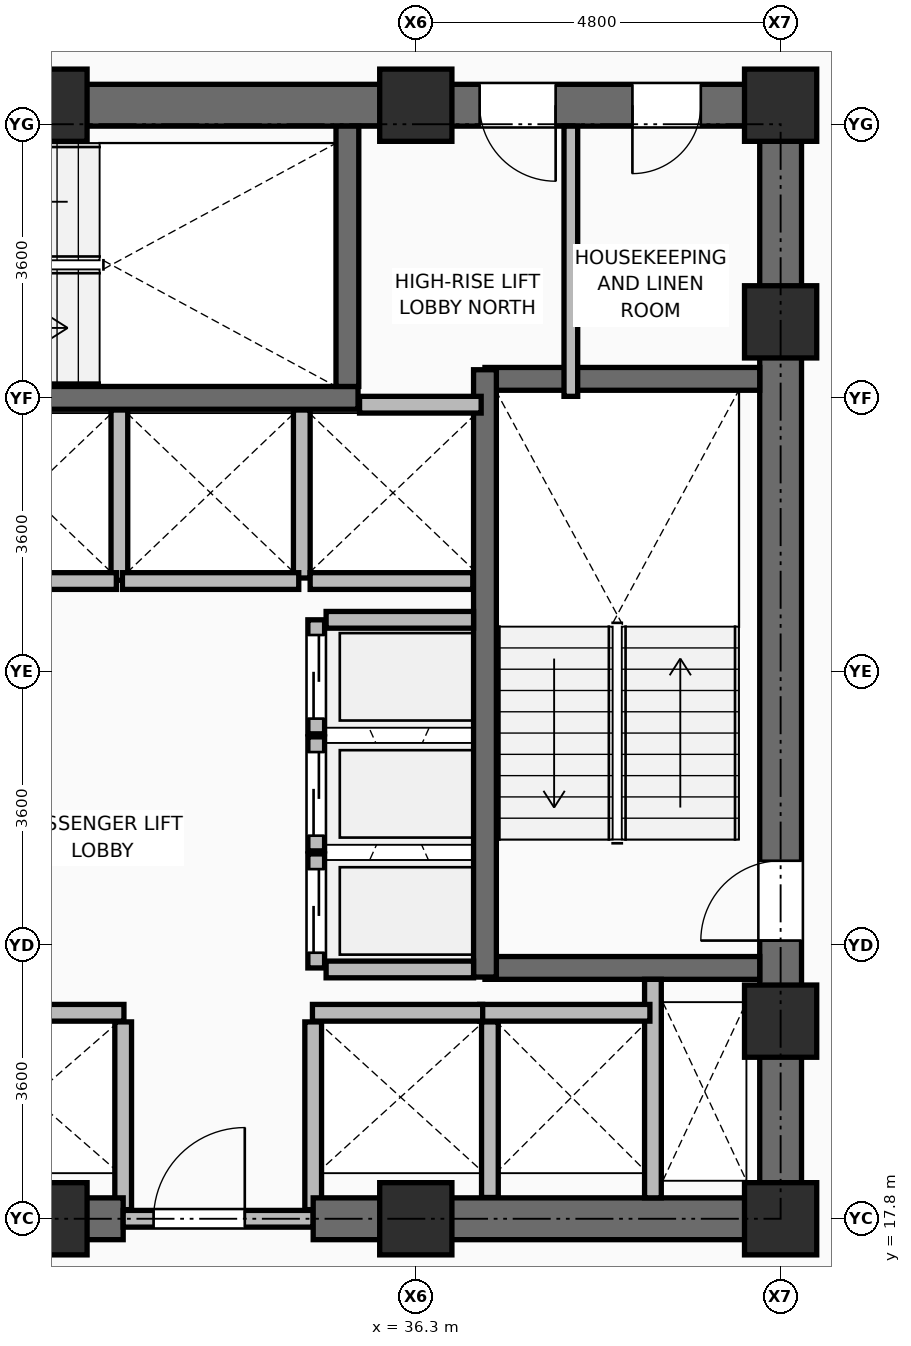
"""IFC4 building model, lengths in metres.
Left out: names, types, materials, properties, quantities, classifications, styles, units other than length and angle.
Written with IfcOpenShell. Run it as: python <this file> out.ifc"""

import sys

from ifc_helpers import new_model, si_unit, direction, frame, frame_2d, origin, origin_2d, place, context, subcontext, project, spatial, rectangle, extrude, element, fill, save


model = new_model("IFC4")
c1 = context("Model", 3, precision=1e-05, world=origin(), true_north=direction((0.0, 1.0)))
c2 = subcontext(c1, "Body", "Model", "MODEL_VIEW")
j1 = project(units=[si_unit("LENGTHUNIT", "METRE"), si_unit("PLANEANGLEUNIT", "RADIAN")], contexts=[c1])
p1 = place(None, origin())
s1 = spatial("IfcSite", under=j1, at=p1, CompositionType="ELEMENT")
p2 = place(p1, origin())
s2 = spatial("IfcBuilding", under=s1, at=p2, CompositionType="ELEMENT")
p3 = place(p2, frame((0.0, 0.0, 142.2)))
s3 = spatial("IfcBuildingStorey", under=s2, at=p3, CompositionType="ELEMENT", Elevation=142.2)
for number, where, z_axis, x_axis in (
    (1, (31.5, 17.8, 0.0), (0.0, 0.0, 1.0), (1.0, 0.0, 0.0)),
    (2, (36.3, 17.8, 0.0), (0.0, 0.0, 1.0), (1.0, 0.0, 0.0)),
    (3, (41.1, 17.8, 0.0), (0.0, 0.0, 1.0), (1.0, 0.0, 0.0)),
    (4, (41.1, 20.4, 0.0), (0.0, 0.0, 1.0), (1.0, 0.0, 0.0)),
    (5, (41.1, 29.6, 0.0), (0.0, 0.0, 1.0), (1.0, 0.0, 0.0)),
    (6, (31.5, 32.45, 0.0), (0.0, 0.0, 1.0), (1.0, 0.0, 0.0)),
    (7, (36.3, 32.45, 0.0), (0.0, 0.0, 1.0), (1.0, 0.0, 0.0)),
    (8, (41.1, 32.45, 0.0), (0.0, 0.0, 1.0), (1.0, 0.0, 0.0)),
):
    element("IfcColumn", number, at=place(p3, frame(where, z_axis=z_axis, x_axis=x_axis)), inside=s3, PredefinedType="COLUMN", context=c2, shape_type="SweptSolid", body=[
        extrude(rectangle(XDim=0.95, YDim=0.95, at=origin_2d()), origin(), (0.0, 0.0, 1.0), 3.75),
    ])
for number, where, z_axis, x_axis in (
    (9, (32.45, 17.92, 0.0), (0.0, 0.0, 1.0), (0.0, 1.0, 0.0)),
    (10, (34.95, 17.92, 0.0), (0.0, 0.0, 1.0), (0.0, 1.0, 0.0)),
):
    element("IfcWall", number, at=place(p3, frame(where, z_axis=z_axis, x_axis=x_axis)), inside=s3, PredefinedType="PARTITIONING", context=c2, shape_type="SweptSolid", body=[
        extrude(rectangle(XDim=2.47, YDim=0.22, at=frame_2d((1.235, 0.0))), origin(), (0.0, 0.0, 1.0), 3.006),
    ])
p4 = place(p3, frame((37.275, 18.08, 0.0), z_axis=(0.0, 0.0, 1.0), x_axis=(0.0, 1.0, 0.0)))
e11 = element("IfcWall", 11, at=p4, inside=s3, PredefinedType="PARTITIONING", context=c2, shape_type="SweptSolid", body=[
    extrude(rectangle(XDim=2.31, YDim=0.22, at=frame_2d((1.155, 0.0))), origin(), (0.0, 0.0, 1.0), 3.545),
])
p5 = place(p3, frame((32.4, 26.2, 0.0), z_axis=(0.0, 0.0, 1.0), x_axis=(0.0, 1.0, 0.0)))
e12 = element("IfcWall", 12, at=p5, inside=s3, PredefinedType="PARTITIONING", context=c2, shape_type="SweptSolid", body=[
    extrude(rectangle(XDim=2.24, YDim=0.22, at=frame_2d((1.12, 0.0))), origin(), (0.0, 0.0, 1.0), 3.545),
])
p6 = place(p3, frame((34.8, 26.23, 0.0), z_axis=(0.0, 0.0, 1.0), x_axis=(0.0, 1.0, 0.0)))
e13 = element("IfcWall", 13, at=p6, inside=s3, PredefinedType="PARTITIONING", context=c2, shape_type="SweptSolid", body=[
    extrude(rectangle(XDim=2.21, YDim=0.22, at=frame_2d((1.105, 0.0))), origin(), (0.0, 0.0, 1.0), 3.545),
])
p7 = place(p3, frame((34.91, 26.19, 0.0), z_axis=(0.0, 0.0, 1.0), x_axis=(1.0, 0.0, 0.0)))
e14 = element("IfcWall", 14, at=p7, inside=s3, PredefinedType="PARTITIONING", context=c2, shape_type="SweptSolid", body=[
    extrude(rectangle(XDim=2.14, YDim=0.22, at=frame_2d((1.07, 0.0))), origin(), (0.0, 0.0, 1.0), 3.545),
])
p8 = place(p3, frame((25.55, 17.8, 0.0), z_axis=(0.0, 0.0, 1.0), x_axis=(1.0, 0.0, 0.0)))
e15 = element("IfcWall", 15, at=p8, inside=s3, PredefinedType="SHEAR", context=c2, shape_type="SweptSolid", body=[
    extrude(rectangle(XDim=6.9, YDim=0.55, at=frame_2d((3.45, 0.0))), origin(), (0.0, 0.0, 1.0), 3.57),
])
p9 = place(p3, frame((32.45, 17.8, 0.0), z_axis=(0.0, 0.0, 1.0), x_axis=(1.0, 0.0, 0.0)))
e16 = element("IfcWall", 16, at=p9, inside=s3, PredefinedType="PARTITIONING", context=c2, shape_type="SweptSolid", body=[
    extrude(rectangle(XDim=2.5, YDim=0.22, at=frame_2d((1.25, 0.0))), origin(), (0.0, 0.0, 1.0), 3.006),
])
p10 = place(p9, frame((0.4, 0.0, 0.0)))
e17 = element("IfcOpeningElement", 17, at=p10, cuts=e16, PredefinedType="OPENING", context=c2, shape_type="SweptSolid", body=[
    extrude(rectangle(XDim=1.2, YDim=2.1, at=frame_2d((0.6, 1.05))), frame((0.0, 0.12, 0.0), z_axis=(0.0, -1.0, 0.0), x_axis=(1.0, 0.0, 0.0)), (0.0, 0.0, 1.0), 0.24),
])
p11 = place(p3, frame((34.95, 17.8, 0.0), z_axis=(0.0, 0.0, 1.0), x_axis=(1.0, 0.0, 0.0)))
e18 = element("IfcWall", 18, at=p11, inside=s3, PredefinedType="SHEAR", context=c2, shape_type="SweptSolid", body=[
    extrude(rectangle(XDim=6.425, YDim=0.55, at=frame_2d((3.212, 0.0))), origin(), (0.0, 0.0, 1.0), 3.57),
])
p12 = place(p3, frame((21.625, 32.45, 0.0), z_axis=(0.0, 0.0, 1.0), x_axis=(1.0, 0.0, 0.0)))
e19 = element("IfcWall", 19, at=p12, inside=s3, PredefinedType="SHEAR", context=c2, shape_type="SweptSolid", body=[
    extrude(rectangle(XDim=19.75, YDim=0.55, at=frame_2d((9.875, 0.0))), origin(), (0.0, 0.0, 1.0), 3.57),
])
p13 = place(p12, frame((2.125, 0.0, 0.0)))
e20 = element("IfcOpeningElement", 20, at=p13, cuts=e19, PredefinedType="OPENING", context=c2, shape_type="SweptSolid", body=[
    extrude(rectangle(XDim=1.1, YDim=2.1, at=frame_2d((0.55, 1.05))), frame((0.0, 0.285, 0.0), z_axis=(0.0, -1.0, 0.0), x_axis=(1.0, 0.0, 0.0)), (0.0, 0.0, 1.0), 0.57),
])
p14 = place(p12, frame((15.515, 0.0, 0.0)))
e21 = element("IfcOpeningElement", 21, at=p14, cuts=e19, PredefinedType="OPENING", context=c2, shape_type="SweptSolid", body=[
    extrude(rectangle(XDim=1.0, YDim=2.1, at=frame_2d((0.5, 1.05))), frame((0.0, 0.285, 0.0), z_axis=(0.0, -1.0, 0.0), x_axis=(1.0, 0.0, 0.0)), (0.0, 0.0, 1.0), 0.57),
])
p15 = place(p12, frame((17.525, 0.0, 0.0)))
e22 = element("IfcOpeningElement", 22, at=p15, cuts=e19, PredefinedType="OPENING", context=c2, shape_type="SweptSolid", body=[
    extrude(rectangle(XDim=0.9, YDim=2.1, at=frame_2d((0.45, 1.05))), frame((0.0, 0.285, 0.0), z_axis=(0.0, -1.0, 0.0), x_axis=(1.0, 0.0, 0.0)), (0.0, 0.0, 1.0), 0.57),
])
p16 = place(p3, frame((41.1, 18.075, 0.0), z_axis=(0.0, 0.0, 1.0), x_axis=(0.0, 1.0, 0.0)))
e23 = element("IfcWall", 23, at=p16, inside=s3, PredefinedType="SHEAR", context=c2, shape_type="SweptSolid", body=[
    extrude(rectangle(XDim=14.1, YDim=0.55, at=frame_2d((7.05, 0.0))), origin(), (0.0, 0.0, 1.0), 3.57),
])
p17 = place(p16, frame((3.385, 0.0, 0.0)))
e24 = element("IfcOpeningElement", 24, at=p17, cuts=e23, PredefinedType="OPENING", context=c2, shape_type="SweptSolid", body=[
    extrude(rectangle(XDim=1.05, YDim=2.1, at=frame_2d((0.525, 1.05))), frame((0.0, 0.285, 0.0), z_axis=(0.0, -1.0, 0.0), x_axis=(1.0, 0.0, 0.0)), (0.0, 0.0, 1.0), 0.57),
])
for number, where, z_axis, x_axis in (
    (25, (37.21, 21.1, 0.0), (0.0, 0.0, 1.0), (1.0, 0.0, 0.0)),
    (26, (37.21, 28.85, 0.0), (0.0, 0.0, 1.0), (1.0, 0.0, 0.0)),
):
    element("IfcWall", number, at=place(p3, frame(where, z_axis=z_axis, x_axis=x_axis)), inside=s3, PredefinedType="SHEAR", context=c2, shape_type="SweptSolid", body=[
        extrude(rectangle(XDim=3.615, YDim=0.3, at=frame_2d((1.808, 0.0))), origin(), (0.0, 0.0, 1.0), 3.57),
    ])
p18 = place(p3, frame((37.21, 20.98, 0.0), z_axis=(0.0, 0.0, 1.0), x_axis=(0.0, 1.0, 0.0)))
e27 = element("IfcWall", 27, at=p18, inside=s3, PredefinedType="SHEAR", context=c2, shape_type="SweptSolid", body=[
    extrude(rectangle(XDim=7.99, YDim=0.3, at=frame_2d((3.995, 0.0))), origin(), (0.0, 0.0, 1.0), 3.57),
])
p19 = place(p3, frame((27.51, 28.6, 0.0), z_axis=(0.0, 0.0, 1.0), x_axis=(1.0, 0.0, 0.0)))
e28 = element("IfcWall", 28, at=p19, inside=s3, PredefinedType="SHEAR", context=c2, shape_type="SweptSolid", body=[
    extrude(rectangle(XDim=8.03, YDim=0.3, at=frame_2d((4.015, 0.0))), origin(), (0.0, 0.0, 1.0), 3.57),
])
p20 = place(p3, frame((35.4, 28.75, 0.0), z_axis=(0.0, 0.0, 1.0), x_axis=(0.0, 1.0, 0.0)))
e29 = element("IfcWall", 29, at=p20, inside=s3, PredefinedType="SHEAR", context=c2, shape_type="SweptSolid", body=[
    extrude(rectangle(XDim=3.425, YDim=0.3, at=frame_2d((1.712, 0.0))), origin(), (0.0, 0.0, 1.0), 3.57),
])
p21 = place(p3, frame((39.42, 18.075, 0.0), z_axis=(0.0, 0.0, 1.0), x_axis=(0.0, 1.0, 0.0)))
e30 = element("IfcWall", 30, at=p21, inside=s3, PredefinedType="PARTITIONING", context=c2, shape_type="SweptSolid", body=[
    extrude(rectangle(XDim=2.875, YDim=0.22, at=frame_2d((1.438, 0.0))), origin(), (0.0, 0.0, 1.0), 3.55),
])
p22 = place(p3, frame((30.04, 20.51, 0.0), z_axis=(0.0, 0.0, 1.0), x_axis=(1.0, 0.0, 0.0)))
e31 = element("IfcWall", 31, at=p22, inside=s3, PredefinedType="PARTITIONING", context=c2, shape_type="SweptSolid", body=[
    extrude(rectangle(XDim=2.42, YDim=0.22, at=frame_2d((1.21, 0.0))), origin(), (0.0, 0.0, 1.0), 3.55),
])
for number, where, z_axis, x_axis in (
    (32, (37.14, 20.51, 0.0), (0.0, 0.0, 1.0), (1.0, 0.0, 0.0)),
    (33, (34.94, 20.51, 0.0), (0.0, 0.0, 1.0), (1.0, 0.0, 0.0)),
):
    element("IfcWall", number, at=place(p3, frame(where, z_axis=z_axis, x_axis=x_axis)), inside=s3, PredefinedType="PARTITIONING", context=c2, shape_type="SweptSolid", body=[
        extrude(rectangle(XDim=2.24, YDim=0.22, at=frame_2d((1.12, 0.0))), origin(), (0.0, 0.0, 1.0), 3.55),
    ])
for number, where, z_axis, x_axis in (
    (34, (30.04, 26.19, 0.0), (0.0, 0.0, 1.0), (1.0, 0.0, 0.0)),
    (35, (32.44, 26.19, 0.0), (0.0, 0.0, 1.0), (1.0, 0.0, 0.0)),
):
    element("IfcWall", number, at=place(p3, frame(where, z_axis=z_axis, x_axis=x_axis)), inside=s3, PredefinedType="PARTITIONING", context=c2, shape_type="SweptSolid", body=[
        extrude(rectangle(XDim=2.32, YDim=0.22, at=frame_2d((1.16, 0.0))), origin(), (0.0, 0.0, 1.0), 3.55),
    ])
p23 = place(p3, frame((35.56, 28.51, 0.0), z_axis=(0.0, 0.0, 1.0), x_axis=(1.0, 0.0, 0.0)))
e36 = element("IfcWall", 36, at=p23, inside=s3, PredefinedType="PARTITIONING", context=c2, shape_type="SweptSolid", body=[
    extrude(rectangle(XDim=1.6, YDim=0.22, at=frame_2d((0.8, 0.0))), origin(), (0.0, 0.0, 1.0), 3.55),
])
p24 = place(p3, frame((34.99, 21.1, 0.0), z_axis=(0.0, 0.0, 1.0), x_axis=(0.0, 1.0, 0.0)))
e37 = element("IfcWall", 37, at=p24, inside=s3, PredefinedType="PARTITIONING", context=c2, shape_type="SweptSolid", body=[
    extrude(rectangle(XDim=1.5, YDim=0.22, at=frame_2d((0.75, 0.0))), origin(), (0.0, 0.0, 1.0), 3.55),
])
p25 = place(p24, frame((0.2, 0.0, 0.0)))
e38 = element("IfcOpeningElement", 38, at=p25, cuts=e37, PredefinedType="OPENING", context=c2, shape_type="SweptSolid", body=[
    extrude(rectangle(XDim=1.1, YDim=2.2, at=frame_2d((0.55, 1.1))), frame((0.0, 0.12, 0.0), z_axis=(0.0, -1.0, 0.0), x_axis=(1.0, 0.0, 0.0)), (0.0, 0.0, 1.0), 0.24),
])
p26 = place(p3, frame((34.99, 22.64, 0.0), z_axis=(0.0, 0.0, 1.0), x_axis=(0.0, 1.0, 0.0)))
e39 = element("IfcWall", 39, at=p26, inside=s3, PredefinedType="PARTITIONING", context=c2, shape_type="SweptSolid", body=[
    extrude(rectangle(XDim=1.5, YDim=0.22, at=frame_2d((0.75, 0.0))), origin(), (0.0, 0.0, 1.0), 3.55),
])
p27 = place(p26, frame((0.2, 0.0, 0.0)))
e40 = element("IfcOpeningElement", 40, at=p27, cuts=e39, PredefinedType="OPENING", context=c2, shape_type="SweptSolid", body=[
    extrude(rectangle(XDim=1.1, YDim=2.2, at=frame_2d((0.55, 1.1))), frame((0.0, 0.12, 0.0), z_axis=(0.0, -1.0, 0.0), x_axis=(1.0, 0.0, 0.0)), (0.0, 0.0, 1.0), 0.24),
])
p28 = place(p3, frame((34.99, 24.18, 0.0), z_axis=(0.0, 0.0, 1.0), x_axis=(0.0, 1.0, 0.0)))
e41 = element("IfcWall", 41, at=p28, inside=s3, PredefinedType="PARTITIONING", context=c2, shape_type="SweptSolid", body=[
    extrude(rectangle(XDim=1.5, YDim=0.22, at=frame_2d((0.75, 0.0))), origin(), (0.0, 0.0, 1.0), 3.55),
])
p29 = place(p28, frame((0.2, 0.0, 0.0)))
e42 = element("IfcOpeningElement", 42, at=p29, cuts=e41, PredefinedType="OPENING", context=c2, shape_type="SweptSolid", body=[
    extrude(rectangle(XDim=1.1, YDim=2.2, at=frame_2d((0.55, 1.1))), frame((0.0, 0.12, 0.0), z_axis=(0.0, -1.0, 0.0), x_axis=(1.0, 0.0, 0.0)), (0.0, 0.0, 1.0), 0.24),
])
for number, where, z_axis, x_axis in (
    (43, (35.12, 21.08, 0.0), (0.0, 0.0, 1.0), (1.0, 0.0, 0.0)),
    (44, (35.12, 25.68, 0.0), (0.0, 0.0, 1.0), (1.0, 0.0, 0.0)),
):
    element("IfcWall", number, at=place(p3, frame(where, z_axis=z_axis, x_axis=x_axis)), inside=s3, PredefinedType="PARTITIONING", context=c2, shape_type="SweptSolid", body=[
        extrude(rectangle(XDim=1.94, YDim=0.22, at=frame_2d((0.97, 0.0))), origin(), (0.0, 0.0, 1.0), 3.55),
    ])
p30 = place(p3, frame((38.34, 28.62, 0.0), z_axis=(0.0, 0.0, 1.0), x_axis=(0.0, 1.0, 0.0)))
e45 = element("IfcWall", 45, at=p30, inside=s3, PredefinedType="PARTITIONING", context=c2, shape_type="SweptSolid", body=[
    extrude(rectangle(XDim=3.555, YDim=0.18, at=frame_2d((1.777, 0.0))), origin(), (0.0, 0.0, 1.0), 3.55),
])
p31 = place(p10, origin())
e46 = element("IfcDoor", 46, at=p31, inside=s3, OperationType="SINGLE_SWING_RIGHT", PredefinedType="DOOR", context=c2, shape_type="SweptSolid", body=[
    extrude(rectangle(XDim=1.2, YDim=2.1, at=frame_2d((0.6, 1.05))), frame((0.0, 0.025, 0.0), z_axis=(0.0, -1.0, 0.0), x_axis=(1.0, 0.0, 0.0)), (0.0, 0.0, 1.0), 0.05),
])
fill(e17, e46)
p32 = place(p17, origin())
e47 = element("IfcDoor", 47, at=p32, inside=s3, OperationType="SINGLE_SWING_LEFT", PredefinedType="DOOR", context=c2, shape_type="SweptSolid", body=[
    extrude(rectangle(XDim=1.05, YDim=2.1, at=frame_2d((0.525, 1.05))), frame((0.0, 0.025, 0.0), z_axis=(0.0, -1.0, 0.0), x_axis=(1.0, 0.0, 0.0)), (0.0, 0.0, 1.0), 0.05),
])
fill(e24, e47)
p33 = place(p25, origin())
e48 = element("IfcDoor", 48, at=p33, inside=s3, OperationType="DOUBLE_DOOR_SLIDING", PredefinedType="DOOR", context=c2, shape_type="SweptSolid", body=[
    extrude(rectangle(XDim=1.1, YDim=2.2, at=frame_2d((0.55, 1.1))), frame((0.0, 0.025, 0.0), z_axis=(0.0, -1.0, 0.0), x_axis=(1.0, 0.0, 0.0)), (0.0, 0.0, 1.0), 0.05),
])
fill(e38, e48)
p34 = place(p27, origin())
e49 = element("IfcDoor", 49, at=p34, inside=s3, OperationType="DOUBLE_DOOR_SLIDING", PredefinedType="DOOR", context=c2, shape_type="SweptSolid", body=[
    extrude(rectangle(XDim=1.1, YDim=2.2, at=frame_2d((0.55, 1.1))), frame((0.0, 0.025, 0.0), z_axis=(0.0, -1.0, 0.0), x_axis=(1.0, 0.0, 0.0)), (0.0, 0.0, 1.0), 0.05),
])
fill(e40, e49)
p35 = place(p29, origin())
e50 = element("IfcDoor", 50, at=p35, inside=s3, OperationType="DOUBLE_DOOR_SLIDING", PredefinedType="DOOR", context=c2, shape_type="SweptSolid", body=[
    extrude(rectangle(XDim=1.1, YDim=2.2, at=frame_2d((0.55, 1.1))), frame((0.0, 0.025, 0.0), z_axis=(0.0, -1.0, 0.0), x_axis=(1.0, 0.0, 0.0)), (0.0, 0.0, 1.0), 0.05),
])
fill(e42, e50)
p36 = place(p14, frame((1.0, 0.0, 0.0), z_axis=(0.0, 0.0, 1.0), x_axis=(-1.0, 0.0, 0.0)))
e51 = element("IfcDoor", 51, at=p36, inside=s3, OperationType="SINGLE_SWING_LEFT", PredefinedType="DOOR", context=c2, shape_type="SweptSolid", body=[
    extrude(rectangle(XDim=1.0, YDim=2.1, at=frame_2d((0.5, 1.05))), frame((0.0, 0.025, 0.0), z_axis=(0.0, -1.0, 0.0), x_axis=(1.0, 0.0, 0.0)), (0.0, 0.0, 1.0), 0.05),
])
fill(e21, e51)
p37 = place(p15, frame((0.9, 0.0, 0.0), z_axis=(0.0, 0.0, 1.0), x_axis=(-1.0, 0.0, 0.0)))
e52 = element("IfcDoor", 52, at=p37, inside=s3, OperationType="SINGLE_SWING_RIGHT", PredefinedType="DOOR", context=c2, shape_type="SweptSolid", body=[
    extrude(rectangle(XDim=0.9, YDim=2.1, at=frame_2d((0.45, 1.05))), frame((0.0, 0.025, 0.0), z_axis=(0.0, -1.0, 0.0), x_axis=(1.0, 0.0, 0.0)), (0.0, 0.0, 1.0), 0.05),
])
fill(e22, e52)
save(model, sys.argv[1])
